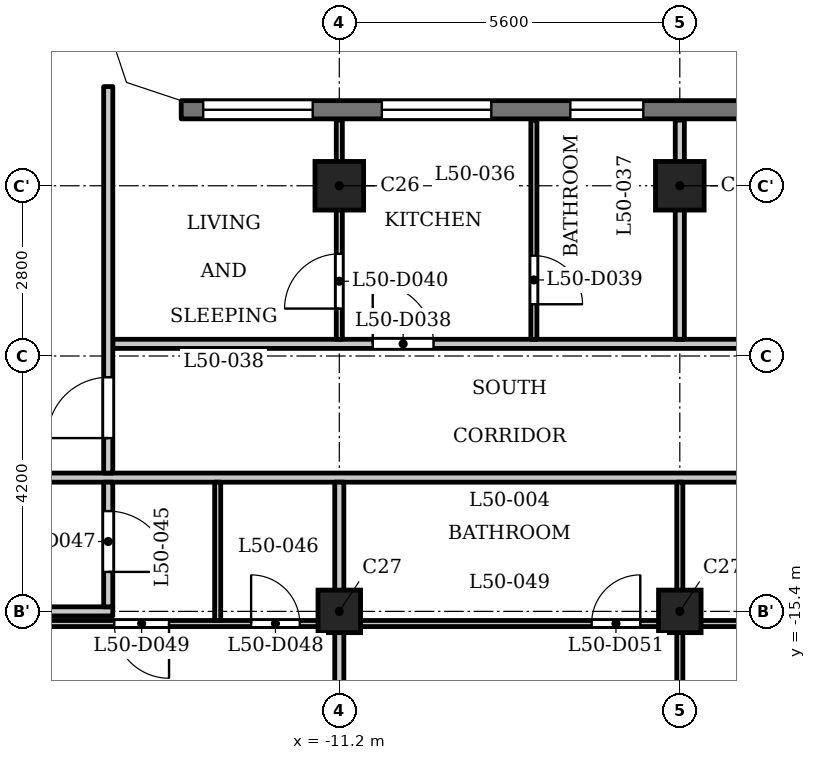
"""IFC4 building model, lengths in metres.
Left out: names, types, materials, properties, quantities, classifications, styles, units other than length and angle.
Written with IfcOpenShell. Run it as: python <this file> out.ifc"""

import sys

from ifc_helpers import new_model, si_unit, direction, frame, frame_2d, origin, origin_2d, place, context, subcontext, project, spatial, polyline, rectangle, outline, extrude, element, fill, save


model = new_model("IFC4")
c1 = context("Model", 3, precision=1e-05, world=origin(), true_north=direction((0.0, 1.0)))
c2 = subcontext(c1, "Body", "Model", "MODEL_VIEW")
j1 = project(units=[si_unit("LENGTHUNIT", "METRE"), si_unit("PLANEANGLEUNIT", "RADIAN")], contexts=[c1])
p1 = place(None, origin())
s1 = spatial("IfcSite", under=j1, at=p1, CompositionType="ELEMENT")
p2 = place(p1, origin())
s2 = spatial("IfcBuilding", under=s1, at=p2, CompositionType="ELEMENT")
p3 = place(p2, frame((0.0, 0.0, 195.9)))
s3 = spatial("IfcBuildingStorey", under=s2, at=p3, CompositionType="ELEMENT", Elevation=195.9)
for number, where, z_axis, x_axis in (
    (1, (-11.2, -8.4, 0.0), (0.0, 0.0, 1.0), (1.0, 0.0, 0.0)),
    (2, (-5.6, -8.4, 0.0), (0.0, 0.0, 1.0), (1.0, 0.0, 0.0)),
):
    element("IfcColumn", number, at=place(p3, frame(where, z_axis=z_axis, x_axis=x_axis)), inside=s3, PredefinedType="COLUMN", context=c2, shape_type="SweptSolid", body=[
        extrude(rectangle(XDim=0.8, YDim=0.8, at=origin_2d()), origin(), (0.0, 0.0, 1.0), 3.5),
    ])
for number, where, z_axis, x_axis in (
    (3, (-11.2, -15.4, 0.0), (0.0, 0.0, 1.0), (1.0, 0.0, 0.0)),
    (4, (-5.6, -15.4, 0.0), (0.0, 0.0, 1.0), (1.0, 0.0, 0.0)),
):
    element("IfcColumn", number, at=place(p3, frame(where, z_axis=z_axis, x_axis=x_axis)), inside=s3, PredefinedType="COLUMN", context=c2, shape_type="SweptSolid", body=[
        extrude(rectangle(XDim=0.7, YDim=0.7, at=origin_2d()), origin(), (0.0, 0.0, 1.0), 3.5),
    ])
p4 = place(p3, frame((13.8, -7.15, 0.0), z_axis=(0.0, 0.0, 1.0), x_axis=(-1.0, 0.0, 0.0)))
e5 = element("IfcWall", 5, at=p4, inside=s3, PredefinedType="SOLIDWALL", context=c2, shape_type="SweptSolid", body=[
    extrude(rectangle(XDim=27.6, YDim=0.3, at=frame_2d((13.8, 0.0))), origin(), (0.0, 0.0, 1.0), 3.2),
])
p5 = place(p4, frame((0.363, 0.0, 0.9)))
e6 = element("IfcOpeningElement", 6, at=p5, cuts=e5, PredefinedType="OPENING", context=c2, shape_type="SweptSolid", body=[
    extrude(rectangle(XDim=1.8, YDim=1.25, at=frame_2d((0.9, 0.625))), frame((0.0, 0.16, 0.0), z_axis=(0.0, -1.0, 0.0), x_axis=(1.0, 0.0, 0.0)), (0.0, 0.0, 1.0), 0.32),
])
p6 = place(p4, frame((3.3, 0.0, 0.9)))
e7 = element("IfcOpeningElement", 7, at=p6, cuts=e5, PredefinedType="OPENING", context=c2, shape_type="SweptSolid", body=[
    extrude(rectangle(XDim=1.8, YDim=1.25, at=frame_2d((0.9, 0.625))), frame((0.0, 0.16, 0.0), z_axis=(0.0, -1.0, 0.0), x_axis=(1.0, 0.0, 0.0)), (0.0, 0.0, 1.0), 0.32),
])
p7 = place(p4, frame((6.4, 0.0, 0.6)))
e8 = element("IfcOpeningElement", 8, at=p7, cuts=e5, PredefinedType="OPENING", context=c2, shape_type="SweptSolid", body=[
    extrude(rectangle(XDim=1.2, YDim=1.55, at=frame_2d((0.6, 0.775))), frame((0.0, 0.16, 0.0), z_axis=(0.0, -1.0, 0.0), x_axis=(1.0, 0.0, 0.0)), (0.0, 0.0, 1.0), 0.32),
])
p8 = place(p4, frame((8.8, 0.0, 0.6)))
e9 = element("IfcOpeningElement", 9, at=p8, cuts=e5, PredefinedType="OPENING", context=c2, shape_type="SweptSolid", body=[
    extrude(rectangle(XDim=1.2, YDim=1.55, at=frame_2d((0.6, 0.775))), frame((0.0, 0.16, 0.0), z_axis=(0.0, -1.0, 0.0), x_axis=(1.0, 0.0, 0.0)), (0.0, 0.0, 1.0), 0.32),
])
p9 = place(p4, frame((11.3, 0.0, 0.9)))
e10 = element("IfcOpeningElement", 10, at=p9, cuts=e5, PredefinedType="OPENING", context=c2, shape_type="SweptSolid", body=[
    extrude(rectangle(XDim=1.8, YDim=1.25, at=frame_2d((0.9, 0.625))), frame((0.0, 0.16, 0.0), z_axis=(0.0, -1.0, 0.0), x_axis=(1.0, 0.0, 0.0)), (0.0, 0.0, 1.0), 0.32),
])
p10 = place(p4, frame((14.8, 0.0, 1.2)))
e11 = element("IfcOpeningElement", 11, at=p10, cuts=e5, PredefinedType="OPENING", context=c2, shape_type="SweptSolid", body=[
    extrude(rectangle(XDim=3.6, YDim=0.95, at=frame_2d((1.8, 0.475))), frame((0.0, 0.16, 0.0), z_axis=(0.0, -1.0, 0.0), x_axis=(1.0, 0.0, 0.0)), (0.0, 0.0, 1.0), 0.32),
])
p11 = place(p4, frame((20.0, 0.0, 0.6)))
e12 = element("IfcOpeningElement", 12, at=p11, cuts=e5, PredefinedType="OPENING", context=c2, shape_type="SweptSolid", body=[
    extrude(rectangle(XDim=1.2, YDim=1.55, at=frame_2d((0.6, 0.775))), frame((0.0, 0.16, 0.0), z_axis=(0.0, -1.0, 0.0), x_axis=(1.0, 0.0, 0.0)), (0.0, 0.0, 1.0), 0.32),
])
p12 = place(p4, frame((22.5, 0.0, 0.9)))
e13 = element("IfcOpeningElement", 13, at=p12, cuts=e5, PredefinedType="OPENING", context=c2, shape_type="SweptSolid", body=[
    extrude(rectangle(XDim=1.8, YDim=1.25, at=frame_2d((0.9, 0.625))), frame((0.0, 0.16, 0.0), z_axis=(0.0, -1.0, 0.0), x_axis=(1.0, 0.0, 0.0)), (0.0, 0.0, 1.0), 0.32),
])
p13 = place(p4, frame((25.438, 0.0, 0.9)))
e14 = element("IfcOpeningElement", 14, at=p13, cuts=e5, PredefinedType="OPENING", context=c2, shape_type="SweptSolid", body=[
    extrude(rectangle(XDim=1.8, YDim=1.25, at=frame_2d((0.9, 0.625))), frame((0.0, 0.16, 0.0), z_axis=(0.0, -1.0, 0.0), x_axis=(1.0, 0.0, 0.0)), (0.0, 0.0, 1.0), 0.32),
])
p14 = place(p3, frame((-16.725, -15.6, 0.0), z_axis=(0.0, 0.0, 1.0), x_axis=(1.0, 0.0, 0.0)))
e15 = element("IfcWall", 15, at=p14, inside=s3, PredefinedType="PARTITIONING", context=c2, shape_type="SweptSolid", body=[
    extrude(rectangle(XDim=33.45, YDim=0.1, at=frame_2d((16.725, 0.0))), origin(), (0.0, 0.0, 1.0), 3.2),
])
p15 = place(p14, frame((4.075, 0.0, 0.0)))
e16 = element("IfcOpeningElement", 16, at=p15, cuts=e15, PredefinedType="OPENING", context=c2, shape_type="SweptSolid", body=[
    extrude(rectangle(XDim=0.8, YDim=2.1, at=frame_2d((0.4, 1.05))), frame((0.0, 0.06, 0.0), z_axis=(0.0, -1.0, 0.0), x_axis=(1.0, 0.0, 0.0)), (0.0, 0.0, 1.0), 0.12),
])
p16 = place(p14, frame((1.825, 0.0, 0.0)))
e17 = element("IfcOpeningElement", 17, at=p16, cuts=e15, PredefinedType="OPENING", context=c2, shape_type="SweptSolid", body=[
    extrude(rectangle(XDim=0.9, YDim=2.1, at=frame_2d((0.45, 1.05))), frame((0.0, 0.06, 0.0), z_axis=(0.0, -1.0, 0.0), x_axis=(1.0, 0.0, 0.0)), (0.0, 0.0, 1.0), 0.12),
])
p17 = place(p14, frame((9.675, 0.0, 0.0)))
e18 = element("IfcOpeningElement", 18, at=p17, cuts=e15, PredefinedType="OPENING", context=c2, shape_type="SweptSolid", body=[
    extrude(rectangle(XDim=0.8, YDim=2.1, at=frame_2d((0.4, 1.05))), frame((0.0, 0.06, 0.0), z_axis=(0.0, -1.0, 0.0), x_axis=(1.0, 0.0, 0.0)), (0.0, 0.0, 1.0), 0.12),
])
p18 = place(p14, frame((14.025, 0.0, 0.0)))
e19 = element("IfcOpeningElement", 19, at=p18, cuts=e15, PredefinedType="OPENING", context=c2, shape_type="SweptSolid", body=[
    extrude(rectangle(XDim=0.9, YDim=2.1, at=frame_2d((0.45, 1.05))), frame((0.0, 0.06, 0.0), z_axis=(0.0, -1.0, 0.0), x_axis=(1.0, 0.0, 0.0)), (0.0, 0.0, 1.0), 0.12),
])
p19 = place(p14, frame((20.875, 0.0, 0.0)))
e20 = element("IfcOpeningElement", 20, at=p19, cuts=e15, PredefinedType="OPENING", context=c2, shape_type="SweptSolid", body=[
    extrude(rectangle(XDim=0.8, YDim=2.1, at=frame_2d((0.4, 1.05))), frame((0.0, 0.06, 0.0), z_axis=(0.0, -1.0, 0.0), x_axis=(1.0, 0.0, 0.0)), (0.0, 0.0, 1.0), 0.12),
])
p20 = place(p14, frame((25.225, 0.0, 0.0)))
e21 = element("IfcOpeningElement", 21, at=p20, cuts=e15, PredefinedType="OPENING", context=c2, shape_type="SweptSolid", body=[
    extrude(rectangle(XDim=0.9, YDim=2.1, at=frame_2d((0.45, 1.05))), frame((0.0, 0.06, 0.0), z_axis=(0.0, -1.0, 0.0), x_axis=(1.0, 0.0, 0.0)), (0.0, 0.0, 1.0), 0.12),
])
p21 = place(p14, frame((28.475, 0.0, 0.0)))
e22 = element("IfcOpeningElement", 22, at=p21, cuts=e15, PredefinedType="OPENING", context=c2, shape_type="SweptSolid", body=[
    extrude(rectangle(XDim=0.8, YDim=2.1, at=frame_2d((0.4, 1.05))), frame((0.0, 0.06, 0.0), z_axis=(0.0, -1.0, 0.0), x_axis=(1.0, 0.0, 0.0)), (0.0, 0.0, 1.0), 0.12),
])
p22 = place(p14, frame((30.675, 0.0, 0.0)))
e23 = element("IfcOpeningElement", 23, at=p22, cuts=e15, PredefinedType="OPENING", context=c2, shape_type="SweptSolid", body=[
    extrude(rectangle(XDim=0.9, YDim=2.1, at=frame_2d((0.45, 1.05))), frame((0.0, 0.06, 0.0), z_axis=(0.0, -1.0, 0.0), x_axis=(1.0, 0.0, 0.0)), (0.0, 0.0, 1.0), 0.12),
])
p23 = place(p3, frame((-24.684, -15.4, 0.0), z_axis=(0.0, 0.0, 1.0), x_axis=(1.0, 0.0, 0.0)))
e24 = element("IfcWall", 24, at=p23, inside=s3, PredefinedType="PARTITIONING", context=c2, shape_type="SweptSolid", body=[
    extrude(rectangle(XDim=9.759, YDim=0.15, at=frame_2d((4.879, 0.0))), origin(), (0.0, 0.0, 1.0), 3.2),
])
p24 = place(p23, frame((1.143, 0.0, 0.0)))
e25 = element("IfcOpeningElement", 25, at=p24, cuts=e24, PredefinedType="OPENING", context=c2, shape_type="SweptSolid", body=[
    extrude(rectangle(XDim=1.0, YDim=2.1, at=frame_2d((0.5, 1.05))), frame((0.0, 0.085, 0.0), z_axis=(0.0, -1.0, 0.0), x_axis=(1.0, 0.0, 0.0)), (0.0, 0.0, 1.0), 0.17),
])
p25 = place(p3, frame((-17.4, -13.2, 0.0), z_axis=(0.0, 0.0, 1.0), x_axis=(1.0, 0.0, 0.0)))
e26 = element("IfcWall", 26, at=p25, inside=s3, PredefinedType="PARTITIONING", context=c2, shape_type="SweptSolid", body=[
    extrude(rectangle(XDim=34.8, YDim=0.15, at=frame_2d((17.4, 0.0))), origin(), (0.0, 0.0, 1.0), 3.2),
])
p26 = place(p25, frame((0.15, 0.0, 0.0)))
e27 = element("IfcOpeningElement", 27, at=p26, cuts=e26, PredefinedType="OPENING", context=c2, shape_type="SweptSolid", body=[
    extrude(rectangle(XDim=1.0, YDim=2.1, at=frame_2d((0.5, 1.05))), frame((0.0, 0.085, 0.0), z_axis=(0.0, -1.0, 0.0), x_axis=(1.0, 0.0, 0.0)), (0.0, 0.0, 1.0), 0.17),
])
p27 = place(p25, frame((33.55, 0.0, 0.0)))
e28 = element("IfcOpeningElement", 28, at=p27, cuts=e26, PredefinedType="OPENING", context=c2, shape_type="SweptSolid", body=[
    extrude(rectangle(XDim=1.0, YDim=2.1, at=frame_2d((0.5, 1.05))), frame((0.0, 0.085, 0.0), z_axis=(0.0, -1.0, 0.0), x_axis=(1.0, 0.0, 0.0)), (0.0, 0.0, 1.0), 0.17),
])
p28 = place(p25, frame((15.7, 0.0, 0.0)))
e29 = element("IfcOpeningElement", 29, at=p28, cuts=e26, PredefinedType="OPENING", context=c2, shape_type="SweptSolid", body=[
    extrude(rectangle(XDim=1.0, YDim=2.1, at=frame_2d((0.5, 1.05))), frame((0.0, 0.085, 0.0), z_axis=(0.0, -1.0, 0.0), x_axis=(1.0, 0.0, 0.0)), (0.0, 0.0, 1.0), 0.17),
])
p29 = place(p25, frame((26.9, 0.0, 0.0)))
e30 = element("IfcOpeningElement", 30, at=p29, cuts=e26, PredefinedType="OPENING", context=c2, shape_type="SweptSolid", body=[
    extrude(rectangle(XDim=1.0, YDim=2.1, at=frame_2d((0.5, 1.05))), frame((0.0, 0.085, 0.0), z_axis=(0.0, -1.0, 0.0), x_axis=(1.0, 0.0, 0.0)), (0.0, 0.0, 1.0), 0.17),
])
p30 = place(p3, frame((-14.925, -11.0, 0.0), z_axis=(0.0, 0.0, 1.0), x_axis=(1.0, 0.0, 0.0)))
e31 = element("IfcWall", 31, at=p30, inside=s3, PredefinedType="PARTITIONING", context=c2, shape_type="SweptSolid", body=[
    extrude(rectangle(XDim=29.85, YDim=0.15, at=frame_2d((14.925, 0.0))), origin(), (0.0, 0.0, 1.0), 3.2),
])
p31 = place(p30, frame((4.275, 0.0, 0.0)))
e32 = element("IfcOpeningElement", 32, at=p31, cuts=e31, PredefinedType="OPENING", context=c2, shape_type="SweptSolid", body=[
    extrude(rectangle(XDim=1.0, YDim=2.1, at=frame_2d((0.5, 1.05))), frame((0.0, 0.085, 0.0), z_axis=(0.0, -1.0, 0.0), x_axis=(1.0, 0.0, 0.0)), (0.0, 0.0, 1.0), 0.17),
])
p32 = place(p30, frame((16.475, 0.0, 0.0)))
e33 = element("IfcOpeningElement", 33, at=p32, cuts=e31, PredefinedType="OPENING", context=c2, shape_type="SweptSolid", body=[
    extrude(rectangle(XDim=1.0, YDim=2.1, at=frame_2d((0.5, 1.05))), frame((0.0, 0.085, 0.0), z_axis=(0.0, -1.0, 0.0), x_axis=(1.0, 0.0, 0.0)), (0.0, 0.0, 1.0), 0.17),
])
p33 = place(p30, frame((23.475, 0.0, 0.0)))
e34 = element("IfcOpeningElement", 34, at=p33, cuts=e31, PredefinedType="OPENING", context=c2, shape_type="SweptSolid", body=[
    extrude(rectangle(XDim=1.0, YDim=2.1, at=frame_2d((0.5, 1.05))), frame((0.0, 0.085, 0.0), z_axis=(0.0, -1.0, 0.0), x_axis=(1.0, 0.0, 0.0)), (0.0, 0.0, 1.0), 0.17),
])
p34 = place(p3, frame((-15.0, -15.325, 0.0), z_axis=(0.0, 0.0, 1.0), x_axis=(0.0, 1.0, 0.0)))
e35 = element("IfcWall", 35, at=p34, inside=s3, PredefinedType="PARTITIONING", context=c2, shape_type="SweptSolid", body=[
    extrude(rectangle(XDim=2.05, YDim=0.15, at=frame_2d((1.025, 0.0))), origin(), (0.0, 0.0, 1.0), 3.2),
])
p35 = place(p34, frame((0.574, 0.0, 0.0)))
e36 = element("IfcOpeningElement", 36, at=p35, cuts=e35, PredefinedType="OPENING", context=c2, shape_type="SweptSolid", body=[
    extrude(rectangle(XDim=1.0, YDim=2.1, at=frame_2d((0.5, 1.05))), frame((0.0, 0.085, 0.0), z_axis=(0.0, -1.0, 0.0), x_axis=(1.0, 0.0, 0.0)), (0.0, 0.0, 1.0), 0.17),
])
p36 = place(p3, frame((-15.0, -13.125, 0.0), z_axis=(0.0, 0.0, 1.0), x_axis=(0.0, 1.0, 0.0)))
e37 = element("IfcWall", 37, at=p36, inside=s3, PredefinedType="PARTITIONING", context=c2, shape_type="SweptSolid", body=[
    extrude(rectangle(XDim=6.356, YDim=0.15, at=frame_2d((3.178, 0.0))), origin(), (0.0, 0.0, 1.0), 3.2),
])
p37 = place(p36, frame((0.575, 0.0, 0.0)))
e38 = element("IfcOpeningElement", 38, at=p37, cuts=e37, PredefinedType="OPENING", context=c2, shape_type="SweptSolid", body=[
    extrude(rectangle(XDim=1.0, YDim=2.1, at=frame_2d((0.5, 1.05))), frame((0.0, 0.085, 0.0), z_axis=(0.0, -1.0, 0.0), x_axis=(1.0, 0.0, 0.0)), (0.0, 0.0, 1.0), 0.17),
])
p38 = place(p3, frame((-13.2, -15.55, 0.0), z_axis=(0.0, 0.0, 1.0), x_axis=(0.0, 1.0, 0.0)))
e39 = element("IfcWall", 39, at=p38, inside=s3, PredefinedType="PARTITIONING", context=c2, shape_type="SweptSolid", body=[
    extrude(rectangle(XDim=2.275, YDim=0.1, at=frame_2d((1.138, 0.0))), origin(), (0.0, 0.0, 1.0), 3.2),
])
p39 = place(p3, frame((-11.2, -10.925, 0.0), z_axis=(0.0, 0.0, 1.0), x_axis=(0.0, 1.0, 0.0)))
e40 = element("IfcWall", 40, at=p39, inside=s3, PredefinedType="PARTITIONING", context=c2, shape_type="SweptSolid", body=[
    extrude(rectangle(XDim=3.605, YDim=0.1, at=frame_2d((1.802, 0.0))), origin(), (0.0, 0.0, 1.0), 3.2),
])
p40 = place(p39, frame((0.505, 0.0, 0.0)))
e41 = element("IfcOpeningElement", 41, at=p40, cuts=e40, PredefinedType="OPENING", context=c2, shape_type="SweptSolid", body=[
    extrude(rectangle(XDim=0.9, YDim=2.1, at=frame_2d((0.45, 1.05))), frame((0.0, 0.06, 0.0), z_axis=(0.0, -1.0, 0.0), x_axis=(1.0, 0.0, 0.0)), (0.0, 0.0, 1.0), 0.12),
])
p41 = place(p3, frame((-11.2, -22.08, 0.0), z_axis=(0.0, 0.0, 1.0), x_axis=(0.0, 1.0, 0.0)))
e42 = element("IfcWall", 42, at=p41, inside=s3, PredefinedType="PARTITIONING", context=c2, shape_type="SweptSolid", body=[
    extrude(rectangle(XDim=6.43, YDim=0.15, at=frame_2d((3.215, 0.0))), origin(), (0.0, 0.0, 1.0), 3.2),
])
p42 = place(p3, frame((-11.2, -15.55, 0.0), z_axis=(0.0, 0.0, 1.0), x_axis=(0.0, 1.0, 0.0)))
e43 = element("IfcWall", 43, at=p42, inside=s3, PredefinedType="PARTITIONING", context=c2, shape_type="SweptSolid", body=[
    extrude(rectangle(XDim=2.275, YDim=0.15, at=frame_2d((1.138, 0.0))), origin(), (0.0, 0.0, 1.0), 3.2),
])
p43 = place(p3, frame((-8.0, -10.925, 0.0), z_axis=(0.0, 0.0, 1.0), x_axis=(0.0, 1.0, 0.0)))
e44 = element("IfcWall", 44, at=p43, inside=s3, PredefinedType="PARTITIONING", context=c2, shape_type="SweptSolid", body=[
    extrude(rectangle(XDim=3.605, YDim=0.1, at=frame_2d((1.802, 0.0))), origin(), (0.0, 0.0, 1.0), 3.2),
])
p44 = place(p43, frame((0.576, 0.0, 0.0)))
e45 = element("IfcOpeningElement", 45, at=p44, cuts=e44, PredefinedType="OPENING", context=c2, shape_type="SweptSolid", body=[
    extrude(rectangle(XDim=0.8, YDim=2.1, at=frame_2d((0.4, 1.05))), frame((0.0, 0.06, 0.0), z_axis=(0.0, -1.0, 0.0), x_axis=(1.0, 0.0, 0.0)), (0.0, 0.0, 1.0), 0.12),
])
p45 = place(p3, frame((-5.6, -22.08, 0.0), z_axis=(0.0, 0.0, 1.0), x_axis=(0.0, 1.0, 0.0)))
e46 = element("IfcWall", 46, at=p45, inside=s3, PredefinedType="PARTITIONING", context=c2, shape_type="SweptSolid", body=[
    extrude(rectangle(XDim=6.43, YDim=0.1, at=frame_2d((3.215, 0.0))), origin(), (0.0, 0.0, 1.0), 3.2),
])
p46 = place(p45, frame((4.18, 0.0, 0.0)))
e47 = element("IfcOpeningElement", 47, at=p46, cuts=e46, PredefinedType="OPENING", context=c2, shape_type="SweptSolid", body=[
    extrude(rectangle(XDim=0.9, YDim=2.1, at=frame_2d((0.45, 1.05))), frame((0.0, 0.06, 0.0), z_axis=(0.0, -1.0, 0.0), x_axis=(1.0, 0.0, 0.0)), (0.0, 0.0, 1.0), 0.12),
])
p47 = place(p3, frame((-5.6, -15.55, 0.0), z_axis=(0.0, 0.0, 1.0), x_axis=(0.0, 1.0, 0.0)))
e48 = element("IfcWall", 48, at=p47, inside=s3, PredefinedType="PARTITIONING", context=c2, shape_type="SweptSolid", body=[
    extrude(rectangle(XDim=2.275, YDim=0.1, at=frame_2d((1.138, 0.0))), origin(), (0.0, 0.0, 1.0), 3.2),
])
p48 = place(p3, frame((-5.6, -10.925, 0.0), z_axis=(0.0, 0.0, 1.0), x_axis=(0.0, 1.0, 0.0)))
e49 = element("IfcWall", 49, at=p48, inside=s3, PredefinedType="PARTITIONING", context=c2, shape_type="SweptSolid", body=[
    extrude(rectangle(XDim=3.605, YDim=0.15, at=frame_2d((1.802, 0.0))), origin(), (0.0, 0.0, 1.0), 3.2),
])
p49 = place(p3, origin())
e50 = element("IfcWall", 50, at=p49, inside=s3, PredefinedType="SOLIDWALL", context=c2, shape_type="SweptSolid", body=[
    extrude(outline(polyline([(-14.937, -6.937), (-13.849, -7.3), (-13.8, -7.3), (-13.8, -7.0), (-14.7, -6.7), (-15.0, -5.8), (-15.3, -5.8), (-15.3, -5.849), (-14.937, -6.937)])), origin(), (0.0, 0.0, 1.0), 3.2),
])
p50 = place(p37, origin())
e51 = element("IfcDoor", 51, at=p50, inside=s3, OperationType="SINGLE_SWING_RIGHT", PredefinedType="DOOR", context=c2, shape_type="SweptSolid", body=[
    extrude(rectangle(XDim=1.0, YDim=2.1, at=frame_2d((0.5, 1.05))), frame((0.0, 0.025, 0.0), z_axis=(0.0, -1.0, 0.0), x_axis=(1.0, 0.0, 0.0)), (0.0, 0.0, 1.0), 0.05),
])
fill(e38, e51)
p51 = place(p31, origin())
e52 = element("IfcDoor", 52, at=p51, inside=s3, OperationType="SINGLE_SWING_RIGHT", PredefinedType="DOOR", context=c2, shape_type="SweptSolid", body=[
    extrude(rectangle(XDim=1.0, YDim=2.1, at=frame_2d((0.5, 1.05))), frame((0.0, 0.025, 0.0), z_axis=(0.0, -1.0, 0.0), x_axis=(1.0, 0.0, 0.0)), (0.0, 0.0, 1.0), 0.05),
])
fill(e32, e52)
p52 = place(p44, origin())
e53 = element("IfcDoor", 53, at=p52, inside=s3, OperationType="SINGLE_SWING_LEFT", PredefinedType="DOOR", context=c2, shape_type="SweptSolid", body=[
    extrude(rectangle(XDim=0.8, YDim=2.1, at=frame_2d((0.4, 1.05))), frame((0.0, 0.025, 0.0), z_axis=(0.0, -1.0, 0.0), x_axis=(1.0, 0.0, 0.0)), (0.0, 0.0, 1.0), 0.05),
])
fill(e45, e53)
p53 = place(p40, origin())
e54 = element("IfcDoor", 54, at=p53, inside=s3, OperationType="SINGLE_SWING_RIGHT", PredefinedType="DOOR", context=c2, shape_type="SweptSolid", body=[
    extrude(rectangle(XDim=0.9, YDim=2.1, at=frame_2d((0.45, 1.05))), frame((0.0, 0.025, 0.0), z_axis=(0.0, -1.0, 0.0), x_axis=(1.0, 0.0, 0.0)), (0.0, 0.0, 1.0), 0.05),
])
fill(e41, e54)
p54 = place(p35, origin())
e55 = element("IfcDoor", 55, at=p54, inside=s3, OperationType="SINGLE_SWING_LEFT", PredefinedType="DOOR", context=c2, shape_type="SweptSolid", body=[
    extrude(rectangle(XDim=1.0, YDim=2.1, at=frame_2d((0.5, 1.05))), frame((0.0, 0.025, 0.0), z_axis=(0.0, -1.0, 0.0), x_axis=(1.0, 0.0, 0.0)), (0.0, 0.0, 1.0), 0.05),
])
fill(e36, e55)
p55 = place(p15, origin())
e56 = element("IfcDoor", 56, at=p55, inside=s3, OperationType="SINGLE_SWING_RIGHT", PredefinedType="DOOR", context=c2, shape_type="SweptSolid", body=[
    extrude(rectangle(XDim=0.8, YDim=2.1, at=frame_2d((0.4, 1.05))), frame((0.0, 0.025, 0.0), z_axis=(0.0, -1.0, 0.0), x_axis=(1.0, 0.0, 0.0)), (0.0, 0.0, 1.0), 0.05),
])
fill(e16, e56)
p56 = place(p16, origin())
e57 = element("IfcDoor", 57, at=p56, inside=s3, OperationType="SINGLE_SWING_RIGHT", PredefinedType="DOOR", context=c2, shape_type="SweptSolid", body=[
    extrude(rectangle(XDim=0.9, YDim=2.1, at=frame_2d((0.45, 1.05))), frame((0.0, 0.025, 0.0), z_axis=(0.0, -1.0, 0.0), x_axis=(1.0, 0.0, 0.0)), (0.0, 0.0, 1.0), 0.05),
])
fill(e17, e57)
p57 = place(p17, origin())
e58 = element("IfcDoor", 58, at=p57, inside=s3, OperationType="SINGLE_SWING_LEFT", PredefinedType="DOOR", context=c2, shape_type="SweptSolid", body=[
    extrude(rectangle(XDim=0.8, YDim=2.1, at=frame_2d((0.4, 1.05))), frame((0.0, 0.025, 0.0), z_axis=(0.0, -1.0, 0.0), x_axis=(1.0, 0.0, 0.0)), (0.0, 0.0, 1.0), 0.05),
])
fill(e18, e58)
p58 = place(p11, origin())
e59 = element("IfcWindow", 59, at=p58, inside=s3, PartitioningType="SINGLE_PANEL", PredefinedType="WINDOW", context=c2, shape_type="SweptSolid", body=[
    extrude(rectangle(XDim=1.2, YDim=1.55, at=frame_2d((0.6, 0.775))), frame((0.0, 0.03, 0.0), z_axis=(0.0, -1.0, 0.0), x_axis=(1.0, 0.0, 0.0)), (0.0, 0.0, 1.0), 0.06),
])
fill(e12, e59)
p59 = place(p12, origin())
e60 = element("IfcWindow", 60, at=p59, inside=s3, PartitioningType="SINGLE_PANEL", PredefinedType="WINDOW", context=c2, shape_type="SweptSolid", body=[
    extrude(rectangle(XDim=1.8, YDim=1.25, at=frame_2d((0.9, 0.625))), frame((0.0, 0.03, 0.0), z_axis=(0.0, -1.0, 0.0), x_axis=(1.0, 0.0, 0.0)), (0.0, 0.0, 1.0), 0.06),
])
fill(e13, e60)
p60 = place(p13, origin())
e61 = element("IfcWindow", 61, at=p60, inside=s3, PartitioningType="SINGLE_PANEL", PredefinedType="WINDOW", context=c2, shape_type="SweptSolid", body=[
    extrude(rectangle(XDim=1.8, YDim=1.25, at=frame_2d((0.9, 0.625))), frame((0.0, 0.03, 0.0), z_axis=(0.0, -1.0, 0.0), x_axis=(1.0, 0.0, 0.0)), (0.0, 0.0, 1.0), 0.06),
])
fill(e14, e61)
save(model, sys.argv[1])
